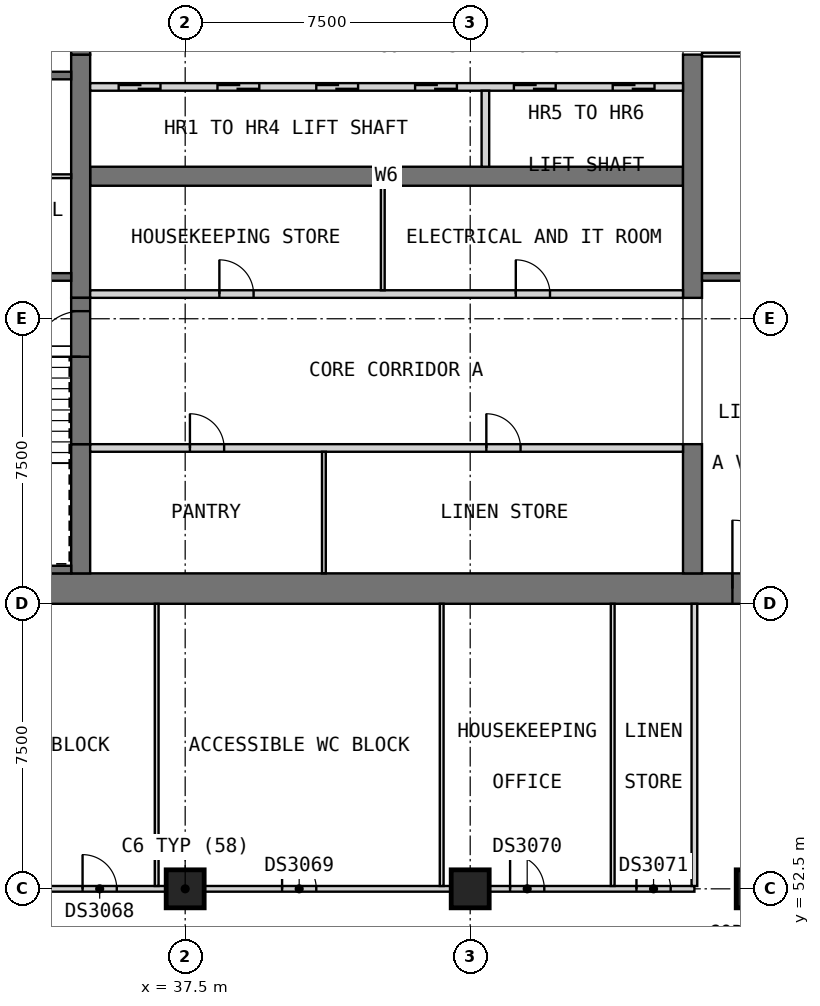
"""IFC4 building model, lengths in metres.
Left out: names, types, materials, properties, quantities, classifications, styles, units other than length and angle.
Written with IfcOpenShell. Run it as: python <this file> out.ifc"""

import sys

from ifc_helpers import new_model, si_unit, direction, frame, frame_2d, origin, origin_2d, place, context, subcontext, project, spatial, rectangle, extrude, element, fill, save


model = new_model("IFC4")
c1 = context("Model", 3, precision=1e-05, world=origin(), true_north=direction((0.0, 1.0)))
c2 = subcontext(c1, "Body", "Model", "MODEL_VIEW")
j1 = project(units=[si_unit("LENGTHUNIT", "METRE"), si_unit("PLANEANGLEUNIT", "RADIAN")], contexts=[c1])
p1 = place(None, origin())
s1 = spatial("IfcSite", under=j1, at=p1, CompositionType="ELEMENT")
p2 = place(p1, origin())
s2 = spatial("IfcBuilding", under=s1, at=p2, CompositionType="ELEMENT")
p3 = place(p2, frame((0.0, 0.0, 137.4)))
s3 = spatial("IfcBuildingStorey", under=s2, at=p3, CompositionType="ELEMENT", Elevation=137.4)
for number, where, z_axis, x_axis in (
    (1, (37.5, 52.5, 0.0), (0.0, 0.0, 1.0), (1.0, 0.0, 0.0)),
    (2, (45.0, 52.5, 0.0), (0.0, 0.0, 1.0), (1.0, 0.0, 0.0)),
    (3, (52.5, 52.5, 0.0), (0.0, 0.0, 1.0), (1.0, 0.0, 0.0)),
):
    element("IfcColumn", number, at=place(p3, frame(where, z_axis=z_axis, x_axis=x_axis)), inside=s3, PredefinedType="COLUMN", context=c2, shape_type="SweptSolid", body=[
        extrude(rectangle(XDim=1.0, YDim=1.0, at=origin_2d()), origin(), (0.0, 0.0, 1.0), 3.6),
    ])
p4 = place(p3, frame((30.0, 60.4, 0.0), z_axis=(0.0, 0.0, 1.0), x_axis=(1.0, 0.0, 0.0)))
e4 = element("IfcWall", 4, at=p4, inside=s3, PredefinedType="SHEAR", context=c2, shape_type="SweptSolid", body=[
    extrude(rectangle(XDim=30.0, YDim=0.8, at=frame_2d((15.0, 0.0))), origin(), (0.0, 0.0, 1.0), 3.6),
])
p5 = place(p4, frame((21.9, 0.0, 0.0)))
e5 = element("IfcOpeningElement", 5, at=p5, cuts=e4, PredefinedType="OPENING", context=c2, shape_type="SweptSolid", body=[
    extrude(rectangle(XDim=1.8, YDim=2.1, at=frame_2d((0.9, 1.05))), frame((0.0, 0.41, 0.0), z_axis=(0.0, -1.0, 0.0), x_axis=(1.0, 0.0, 0.0)), (0.0, 0.0, 1.0), 0.82),
])
p6 = place(p4, frame((26.5, 0.0, 0.0)))
e6 = element("IfcOpeningElement", 6, at=p6, cuts=e4, PredefinedType="OPENING", context=c2, shape_type="SweptSolid", body=[
    extrude(rectangle(XDim=1.2, YDim=2.1, at=frame_2d((0.6, 1.05))), frame((0.0, 0.41, 0.0), z_axis=(0.0, -1.0, 0.0), x_axis=(1.0, 0.0, 0.0)), (0.0, 0.0, 1.0), 0.82),
])
p7 = place(p3, frame((35.0, 71.25, 0.0), z_axis=(0.0, 0.0, 1.0), x_axis=(1.0, 0.0, 0.0)))
e7 = element("IfcWall", 7, at=p7, inside=s3, PredefinedType="SHEAR", context=c2, shape_type="SweptSolid", body=[
    extrude(rectangle(XDim=15.6, YDim=0.5, at=frame_2d((7.8, 0.0))), origin(), (0.0, 0.0, 1.0), 3.6),
])
p8 = place(p3, frame((34.75, 60.8, 0.0), z_axis=(0.0, 0.0, 1.0), x_axis=(0.0, 1.0, 0.0)))
e8 = element("IfcWall", 8, at=p8, inside=s3, PredefinedType="SHEAR", context=c2, shape_type="SweptSolid", body=[
    extrude(rectangle(XDim=3.4, YDim=0.5, at=frame_2d((1.7, 0.0))), origin(), (0.0, 0.0, 1.0), 3.6),
])
p9 = place(p3, frame((34.75, 68.05, 0.0), z_axis=(0.0, 0.0, 1.0), x_axis=(0.0, 1.0, 0.0)))
e9 = element("IfcWall", 9, at=p9, inside=s3, PredefinedType="SHEAR", context=c2, shape_type="SweptSolid", body=[
    extrude(rectangle(XDim=6.4, YDim=0.5, at=frame_2d((3.2, 0.0))), origin(), (0.0, 0.0, 1.0), 3.6),
])
p10 = place(p3, frame((50.85, 60.8, 0.0), z_axis=(0.0, 0.0, 1.0), x_axis=(0.0, 1.0, 0.0)))
e10 = element("IfcWall", 10, at=p10, inside=s3, PredefinedType="SHEAR", context=c2, shape_type="SweptSolid", body=[
    extrude(rectangle(XDim=3.4, YDim=0.5, at=frame_2d((1.7, 0.0))), origin(), (0.0, 0.0, 1.0), 3.6),
])
p11 = place(p3, frame((50.85, 68.05, 0.0), z_axis=(0.0, 0.0, 1.0), x_axis=(0.0, 1.0, 0.0)))
e11 = element("IfcWall", 11, at=p11, inside=s3, PredefinedType="SHEAR", context=c2, shape_type="SweptSolid", body=[
    extrude(rectangle(XDim=6.4, YDim=0.5, at=frame_2d((3.2, 0.0))), origin(), (0.0, 0.0, 1.0), 3.6),
])
p12 = place(p3, frame((35.0, 64.1, 0.0), z_axis=(0.0, 0.0, 1.0), x_axis=(1.0, 0.0, 0.0)))
e12 = element("IfcWall", 12, at=p12, inside=s3, PredefinedType="PARTITIONING", context=c2, shape_type="SweptSolid", body=[
    extrude(rectangle(XDim=15.6, YDim=0.2, at=frame_2d((7.8, 0.0))), origin(), (0.0, 0.0, 1.0), 3.35),
])
p13 = place(p12, frame((2.625, 0.0, 0.0)))
e13 = element("IfcOpeningElement", 13, at=p13, cuts=e12, PredefinedType="OPENING", context=c2, shape_type="SweptSolid", body=[
    extrude(rectangle(XDim=0.9, YDim=2.1, at=frame_2d((0.45, 1.05))), frame((0.0, 0.11, 0.0), z_axis=(0.0, -1.0, 0.0), x_axis=(1.0, 0.0, 0.0)), (0.0, 0.0, 1.0), 0.22),
])
p14 = place(p12, frame((10.425, 0.0, 0.0)))
e14 = element("IfcOpeningElement", 14, at=p14, cuts=e12, PredefinedType="OPENING", context=c2, shape_type="SweptSolid", body=[
    extrude(rectangle(XDim=0.9, YDim=2.1, at=frame_2d((0.45, 1.05))), frame((0.0, 0.11, 0.0), z_axis=(0.0, -1.0, 0.0), x_axis=(1.0, 0.0, 0.0)), (0.0, 0.0, 1.0), 0.22),
])
p15 = place(p3, frame((41.15, 60.8, 0.0), z_axis=(0.0, 0.0, 1.0), x_axis=(0.0, 1.0, 0.0)))
e15 = element("IfcWall", 15, at=p15, inside=s3, PredefinedType="PARTITIONING", context=c2, shape_type="SweptSolid", body=[
    extrude(rectangle(XDim=3.2, YDim=0.1, at=frame_2d((1.6, 0.0))), origin(), (0.0, 0.0, 1.0), 3.35),
])
p16 = place(p3, frame((35.0, 68.15, 0.0), z_axis=(0.0, 0.0, 1.0), x_axis=(1.0, 0.0, 0.0)))
e16 = element("IfcWall", 16, at=p16, inside=s3, PredefinedType="PARTITIONING", context=c2, shape_type="SweptSolid", body=[
    extrude(rectangle(XDim=15.6, YDim=0.2, at=frame_2d((7.8, 0.0))), origin(), (0.0, 0.0, 1.0), 3.35),
])
p17 = place(p16, frame((3.4, 0.0, 0.0)))
e17 = element("IfcOpeningElement", 17, at=p17, cuts=e16, PredefinedType="OPENING", context=c2, shape_type="SweptSolid", body=[
    extrude(rectangle(XDim=0.9, YDim=2.1, at=frame_2d((0.45, 1.05))), frame((0.0, 0.11, 0.0), z_axis=(0.0, -1.0, 0.0), x_axis=(1.0, 0.0, 0.0)), (0.0, 0.0, 1.0), 0.22),
])
p18 = place(p16, frame((11.2, 0.0, 0.0)))
e18 = element("IfcOpeningElement", 18, at=p18, cuts=e16, PredefinedType="OPENING", context=c2, shape_type="SweptSolid", body=[
    extrude(rectangle(XDim=0.9, YDim=2.1, at=frame_2d((0.45, 1.05))), frame((0.0, 0.11, 0.0), z_axis=(0.0, -1.0, 0.0), x_axis=(1.0, 0.0, 0.0)), (0.0, 0.0, 1.0), 0.22),
])
p19 = place(p3, frame((42.7, 68.25, 0.0), z_axis=(0.0, 0.0, 1.0), x_axis=(0.0, 1.0, 0.0)))
e19 = element("IfcWall", 19, at=p19, inside=s3, PredefinedType="PARTITIONING", context=c2, shape_type="SweptSolid", body=[
    extrude(rectangle(XDim=2.75, YDim=0.1, at=frame_2d((1.375, 0.0))), origin(), (0.0, 0.0, 1.0), 3.35),
])
p20 = place(p3, frame((35.0, 73.6, 0.0), z_axis=(0.0, 0.0, 1.0), x_axis=(1.0, 0.0, 0.0)))
e20 = element("IfcWall", 20, at=p20, inside=s3, PredefinedType="SOLIDWALL", context=c2, shape_type="SweptSolid", body=[
    extrude(rectangle(XDim=15.6, YDim=0.2, at=frame_2d((7.8, 0.0))), origin(), (0.0, 0.0, 1.0), 3.6),
])
p21 = place(p20, frame((0.75, 0.0, 0.0)))
e21 = element("IfcOpeningElement", 21, at=p21, cuts=e20, PredefinedType="OPENING", context=c2, shape_type="SweptSolid", body=[
    extrude(rectangle(XDim=1.1, YDim=2.1, at=frame_2d((0.55, 1.05))), frame((0.0, 0.11, 0.0), z_axis=(0.0, -1.0, 0.0), x_axis=(1.0, 0.0, 0.0)), (0.0, 0.0, 1.0), 0.22),
])
p22 = place(p20, frame((3.35, 0.0, 0.0)))
e22 = element("IfcOpeningElement", 22, at=p22, cuts=e20, PredefinedType="OPENING", context=c2, shape_type="SweptSolid", body=[
    extrude(rectangle(XDim=1.1, YDim=2.1, at=frame_2d((0.55, 1.05))), frame((0.0, 0.11, 0.0), z_axis=(0.0, -1.0, 0.0), x_axis=(1.0, 0.0, 0.0)), (0.0, 0.0, 1.0), 0.22),
])
p23 = place(p20, frame((5.95, 0.0, 0.0)))
e23 = element("IfcOpeningElement", 23, at=p23, cuts=e20, PredefinedType="OPENING", context=c2, shape_type="SweptSolid", body=[
    extrude(rectangle(XDim=1.1, YDim=2.1, at=frame_2d((0.55, 1.05))), frame((0.0, 0.11, 0.0), z_axis=(0.0, -1.0, 0.0), x_axis=(1.0, 0.0, 0.0)), (0.0, 0.0, 1.0), 0.22),
])
p24 = place(p20, frame((8.55, 0.0, 0.0)))
e24 = element("IfcOpeningElement", 24, at=p24, cuts=e20, PredefinedType="OPENING", context=c2, shape_type="SweptSolid", body=[
    extrude(rectangle(XDim=1.1, YDim=2.1, at=frame_2d((0.55, 1.05))), frame((0.0, 0.11, 0.0), z_axis=(0.0, -1.0, 0.0), x_axis=(1.0, 0.0, 0.0)), (0.0, 0.0, 1.0), 0.22),
])
p25 = place(p20, frame((11.15, 0.0, 0.0)))
e25 = element("IfcOpeningElement", 25, at=p25, cuts=e20, PredefinedType="OPENING", context=c2, shape_type="SweptSolid", body=[
    extrude(rectangle(XDim=1.1, YDim=2.1, at=frame_2d((0.55, 1.05))), frame((0.0, 0.11, 0.0), z_axis=(0.0, -1.0, 0.0), x_axis=(1.0, 0.0, 0.0)), (0.0, 0.0, 1.0), 0.22),
])
p26 = place(p20, frame((13.75, 0.0, 0.0)))
e26 = element("IfcOpeningElement", 26, at=p26, cuts=e20, PredefinedType="OPENING", context=c2, shape_type="SweptSolid", body=[
    extrude(rectangle(XDim=1.1, YDim=2.1, at=frame_2d((0.55, 1.05))), frame((0.0, 0.11, 0.0), z_axis=(0.0, -1.0, 0.0), x_axis=(1.0, 0.0, 0.0)), (0.0, 0.0, 1.0), 0.22),
])
p27 = place(p3, frame((45.4, 71.5, 0.0), z_axis=(0.0, 0.0, 1.0), x_axis=(0.0, 1.0, 0.0)))
e27 = element("IfcWall", 27, at=p27, inside=s3, PredefinedType="SOLIDWALL", context=c2, shape_type="SweptSolid", body=[
    extrude(rectangle(XDim=2.0, YDim=0.2, at=frame_2d((1.0, 0.0))), origin(), (0.0, 0.0, 1.0), 3.6),
])
p28 = place(p3, frame((34.75, 64.2, 0.0), z_axis=(0.0, 0.0, 1.0), x_axis=(0.0, 1.0, 0.0)))
e28 = element("IfcWall", 28, at=p28, inside=s3, PredefinedType="SOLIDWALL", context=c2, shape_type="SweptSolid", body=[
    extrude(rectangle(XDim=3.85, YDim=0.5, at=frame_2d((1.925, 0.0))), origin(), (0.0, 0.0, 1.0), 2.4),
])
p29 = place(p28, frame((2.3, 0.0, 0.0)))
e29 = element("IfcOpeningElement", 29, at=p29, cuts=e28, PredefinedType="OPENING", context=c2, shape_type="SweptSolid", body=[
    extrude(rectangle(XDim=1.2, YDim=2.1, at=frame_2d((0.6, 1.05))), frame((0.0, 0.26, 0.0), z_axis=(0.0, -1.0, 0.0), x_axis=(1.0, 0.0, 0.0)), (0.0, 0.0, 1.0), 0.52),
])
p30 = place(p3, frame((34.75, 74.45, 0.0), z_axis=(0.0, 0.0, 1.0), x_axis=(0.0, 1.0, 0.0)))
e30 = element("IfcWall", 30, at=p30, inside=s3, PredefinedType="SOLIDWALL", context=c2, shape_type="SweptSolid", body=[
    extrude(rectangle(XDim=3.85, YDim=0.5, at=frame_2d((1.925, 0.0))), origin(), (0.0, 0.0, 1.0), 2.4),
])
p31 = place(p30, frame((1.0, 0.0, 0.0)))
e31 = element("IfcOpeningElement", 31, at=p31, cuts=e30, PredefinedType="OPENING", context=c2, shape_type="SweptSolid", body=[
    extrude(rectangle(XDim=1.2, YDim=2.1, at=frame_2d((0.6, 1.05))), frame((0.0, 0.26, 0.0), z_axis=(0.0, -1.0, 0.0), x_axis=(1.0, 0.0, 0.0)), (0.0, 0.0, 1.0), 0.52),
])
p32 = place(p3, frame((30.8, 68.6, 0.0), z_axis=(0.0, 0.0, 1.0), x_axis=(1.0, 0.0, 0.0)))
e32 = element("IfcWall", 32, at=p32, inside=s3, PredefinedType="SOLIDWALL", context=c2, shape_type="SweptSolid", body=[
    extrude(rectangle(XDim=3.7, YDim=0.2, at=frame_2d((1.85, 0.0))), origin(), (0.0, 0.0, 1.0), 3.35),
])
p33 = place(p32, frame((1.5, 0.0, 0.0)))
e33 = element("IfcOpeningElement", 33, at=p33, cuts=e32, PredefinedType="OPENING", context=c2, shape_type="SweptSolid", body=[
    extrude(rectangle(XDim=0.9, YDim=2.1, at=frame_2d((0.45, 1.05))), frame((0.0, 0.11, 0.0), z_axis=(0.0, -1.0, 0.0), x_axis=(1.0, 0.0, 0.0)), (0.0, 0.0, 1.0), 0.22),
])
p34 = place(p3, frame((30.8, 73.9, 0.0), z_axis=(0.0, 0.0, 1.0), x_axis=(1.0, 0.0, 0.0)))
e34 = element("IfcWall", 34, at=p34, inside=s3, PredefinedType="SOLIDWALL", context=c2, shape_type="SweptSolid", body=[
    extrude(rectangle(XDim=3.7, YDim=0.2, at=frame_2d((1.85, 0.0))), origin(), (0.0, 0.0, 1.0), 3.35),
])
p35 = place(p34, frame((1.5, 0.0, 0.0)))
e35 = element("IfcOpeningElement", 35, at=p35, cuts=e34, PredefinedType="OPENING", context=c2, shape_type="SweptSolid", body=[
    extrude(rectangle(XDim=0.9, YDim=2.1, at=frame_2d((0.45, 1.05))), frame((0.0, 0.11, 0.0), z_axis=(0.0, -1.0, 0.0), x_axis=(1.0, 0.0, 0.0)), (0.0, 0.0, 1.0), 0.22),
])
p36 = place(p3, frame((51.1, 68.6, 0.0), z_axis=(0.0, 0.0, 1.0), x_axis=(1.0, 0.0, 0.0)))
e36 = element("IfcWall", 36, at=p36, inside=s3, PredefinedType="SOLIDWALL", context=c2, shape_type="SweptSolid", body=[
    extrude(rectangle(XDim=8.1, YDim=0.2, at=frame_2d((4.05, 0.0))), origin(), (0.0, 0.0, 1.0), 3.35),
])
p37 = place(p3, frame((31.0, 60.9, 0.0), z_axis=(0.0, 0.0, 1.0), x_axis=(1.0, 0.0, 0.0)))
e37 = element("IfcWall", 37, at=p37, inside=s3, PredefinedType="SOLIDWALL", context=c2, shape_type="SweptSolid", body=[
    extrude(rectangle(XDim=3.5, YDim=0.2, at=frame_2d((1.75, 0.0))), origin(), (0.0, 0.0, 1.0), 3.35),
])
p38 = place(p3, frame((30.8, 71.25, 0.0), z_axis=(0.0, 0.0, 1.0), x_axis=(1.0, 0.0, 0.0)))
e38 = element("IfcWall", 38, at=p38, inside=s3, PredefinedType="PARTITIONING", context=c2, shape_type="SweptSolid", body=[
    extrude(rectangle(XDim=3.7, YDim=0.1, at=frame_2d((1.85, 0.0))), origin(), (0.0, 0.0, 1.0), 3.35),
])
p39 = place(p3, frame((51.1, 74.45, 0.0), z_axis=(0.0, 0.0, 1.0), x_axis=(1.0, 0.0, 0.0)))
e39 = element("IfcWall", 39, at=p39, inside=s3, PredefinedType="PARTITIONING", context=c2, shape_type="SweptSolid", body=[
    extrude(rectangle(XDim=8.1, YDim=0.1, at=frame_2d((4.05, 0.0))), origin(), (0.0, 0.0, 1.0), 3.35),
])
p40 = place(p39, frame((3.6, 0.0, 0.0)))
e40 = element("IfcOpeningElement", 40, at=p40, cuts=e39, PredefinedType="OPENING", context=c2, shape_type="SweptSolid", body=[
    extrude(rectangle(XDim=0.9, YDim=2.1, at=frame_2d((0.45, 1.05))), frame((0.0, 0.06, 0.0), z_axis=(0.0, -1.0, 0.0), x_axis=(1.0, 0.0, 0.0)), (0.0, 0.0, 1.0), 0.12),
])
p41 = place(p3, frame((33.75, 52.5, 0.0), z_axis=(0.0, 0.0, 1.0), x_axis=(1.0, 0.0, 0.0)))
e41 = element("IfcWall", 41, at=p41, inside=s3, PredefinedType="PARTITIONING", context=c2, shape_type="SweptSolid", body=[
    extrude(rectangle(XDim=17.15, YDim=0.15, at=frame_2d((8.575, 0.0))), origin(), (0.0, 0.0, 1.0), 3.35),
])
p42 = place(p41, frame((1.05, 0.0, 0.0)))
e42 = element("IfcOpeningElement", 42, at=p42, cuts=e41, PredefinedType="OPENING", context=c2, shape_type="SweptSolid", body=[
    extrude(rectangle(XDim=0.9, YDim=2.1, at=frame_2d((0.45, 1.05))), frame((0.0, 0.085, 0.0), z_axis=(0.0, -1.0, 0.0), x_axis=(1.0, 0.0, 0.0)), (0.0, 0.0, 1.0), 0.17),
])
p43 = place(p41, frame((6.3, 0.0, 0.0)))
e43 = element("IfcOpeningElement", 43, at=p43, cuts=e41, PredefinedType="OPENING", context=c2, shape_type="SweptSolid", body=[
    extrude(rectangle(XDim=0.9, YDim=2.1, at=frame_2d((0.45, 1.05))), frame((0.0, 0.085, 0.0), z_axis=(0.0, -1.0, 0.0), x_axis=(1.0, 0.0, 0.0)), (0.0, 0.0, 1.0), 0.17),
])
p44 = place(p41, frame((12.3, 0.0, 0.0)))
e44 = element("IfcOpeningElement", 44, at=p44, cuts=e41, PredefinedType="OPENING", context=c2, shape_type="SweptSolid", body=[
    extrude(rectangle(XDim=0.9, YDim=2.1, at=frame_2d((0.45, 1.05))), frame((0.0, 0.085, 0.0), z_axis=(0.0, -1.0, 0.0), x_axis=(1.0, 0.0, 0.0)), (0.0, 0.0, 1.0), 0.17),
])
p45 = place(p41, frame((15.625, 0.0, 0.0)))
e45 = element("IfcOpeningElement", 45, at=p45, cuts=e41, PredefinedType="OPENING", context=c2, shape_type="SweptSolid", body=[
    extrude(rectangle(XDim=0.9, YDim=2.1, at=frame_2d((0.45, 1.05))), frame((0.0, 0.085, 0.0), z_axis=(0.0, -1.0, 0.0), x_axis=(1.0, 0.0, 0.0)), (0.0, 0.0, 1.0), 0.17),
])
for number, where, z_axis, x_axis in (
    (46, (36.75, 52.575, 0.0), (0.0, 0.0, 1.0), (0.0, 1.0, 0.0)),
    (47, (44.25, 52.575, 0.0), (0.0, 0.0, 1.0), (0.0, 1.0, 0.0)),
    (48, (48.75, 52.575, 0.0), (0.0, 0.0, 1.0), (0.0, 1.0, 0.0)),
):
    element("IfcWall", number, at=place(p3, frame(where, z_axis=z_axis, x_axis=x_axis)), inside=s3, PredefinedType="PARTITIONING", context=c2, shape_type="SweptSolid", body=[
        extrude(rectangle(XDim=7.425, YDim=0.1, at=frame_2d((3.712, 0.0))), origin(), (0.0, 0.0, 1.0), 3.35),
    ])
p46 = place(p3, frame((50.9, 52.575, 0.0), z_axis=(0.0, 0.0, 1.0), x_axis=(0.0, 1.0, 0.0)))
e49 = element("IfcWall", 49, at=p46, inside=s3, PredefinedType="PARTITIONING", context=c2, shape_type="SweptSolid", body=[
    extrude(rectangle(XDim=7.425, YDim=0.15, at=frame_2d((3.712, 0.0))), origin(), (0.0, 0.0, 1.0), 3.35),
])
p47 = place(p13, origin())
e50 = element("IfcDoor", 50, at=p47, inside=s3, OperationType="SINGLE_SWING_LEFT", PredefinedType="DOOR", context=c2, shape_type="SweptSolid", body=[
    extrude(rectangle(XDim=0.9, YDim=2.1, at=frame_2d((0.45, 1.05))), frame((0.0, 0.025, 0.0), z_axis=(0.0, -1.0, 0.0), x_axis=(1.0, 0.0, 0.0)), (0.0, 0.0, 1.0), 0.05),
])
fill(e13, e50)
p48 = place(p14, origin())
e51 = element("IfcDoor", 51, at=p48, inside=s3, OperationType="SINGLE_SWING_RIGHT", PredefinedType="DOOR", context=c2, shape_type="SweptSolid", body=[
    extrude(rectangle(XDim=0.9, YDim=2.1, at=frame_2d((0.45, 1.05))), frame((0.0, 0.025, 0.0), z_axis=(0.0, -1.0, 0.0), x_axis=(1.0, 0.0, 0.0)), (0.0, 0.0, 1.0), 0.05),
])
fill(e14, e51)
p49 = place(p17, origin())
e52 = element("IfcDoor", 52, at=p49, inside=s3, OperationType="SINGLE_SWING_LEFT", PredefinedType="DOOR", context=c2, shape_type="SweptSolid", body=[
    extrude(rectangle(XDim=0.9, YDim=2.1, at=frame_2d((0.45, 1.05))), frame((0.0, 0.025, 0.0), z_axis=(0.0, -1.0, 0.0), x_axis=(1.0, 0.0, 0.0)), (0.0, 0.0, 1.0), 0.05),
])
fill(e17, e52)
p50 = place(p18, origin())
e53 = element("IfcDoor", 53, at=p50, inside=s3, OperationType="SINGLE_SWING_RIGHT", PredefinedType="DOOR", context=c2, shape_type="SweptSolid", body=[
    extrude(rectangle(XDim=0.9, YDim=2.1, at=frame_2d((0.45, 1.05))), frame((0.0, 0.025, 0.0), z_axis=(0.0, -1.0, 0.0), x_axis=(1.0, 0.0, 0.0)), (0.0, 0.0, 1.0), 0.05),
])
fill(e18, e53)
p51 = place(p21, origin())
e54 = element("IfcDoor", 54, at=p51, inside=s3, OperationType="DOUBLE_DOOR_SLIDING", PredefinedType="DOOR", context=c2, shape_type="SweptSolid", body=[
    extrude(rectangle(XDim=1.1, YDim=2.1, at=frame_2d((0.55, 1.05))), frame((0.0, 0.025, 0.0), z_axis=(0.0, -1.0, 0.0), x_axis=(1.0, 0.0, 0.0)), (0.0, 0.0, 1.0), 0.05),
])
fill(e21, e54)
p52 = place(p22, origin())
e55 = element("IfcDoor", 55, at=p52, inside=s3, OperationType="DOUBLE_DOOR_SLIDING", PredefinedType="DOOR", context=c2, shape_type="SweptSolid", body=[
    extrude(rectangle(XDim=1.1, YDim=2.1, at=frame_2d((0.55, 1.05))), frame((0.0, 0.025, 0.0), z_axis=(0.0, -1.0, 0.0), x_axis=(1.0, 0.0, 0.0)), (0.0, 0.0, 1.0), 0.05),
])
fill(e22, e55)
p53 = place(p23, origin())
e56 = element("IfcDoor", 56, at=p53, inside=s3, OperationType="DOUBLE_DOOR_SLIDING", PredefinedType="DOOR", context=c2, shape_type="SweptSolid", body=[
    extrude(rectangle(XDim=1.1, YDim=2.1, at=frame_2d((0.55, 1.05))), frame((0.0, 0.025, 0.0), z_axis=(0.0, -1.0, 0.0), x_axis=(1.0, 0.0, 0.0)), (0.0, 0.0, 1.0), 0.05),
])
fill(e23, e56)
p54 = place(p24, origin())
e57 = element("IfcDoor", 57, at=p54, inside=s3, OperationType="DOUBLE_DOOR_SLIDING", PredefinedType="DOOR", context=c2, shape_type="SweptSolid", body=[
    extrude(rectangle(XDim=1.1, YDim=2.1, at=frame_2d((0.55, 1.05))), frame((0.0, 0.025, 0.0), z_axis=(0.0, -1.0, 0.0), x_axis=(1.0, 0.0, 0.0)), (0.0, 0.0, 1.0), 0.05),
])
fill(e24, e57)
p55 = place(p25, origin())
e58 = element("IfcDoor", 58, at=p55, inside=s3, OperationType="DOUBLE_DOOR_SLIDING", PredefinedType="DOOR", context=c2, shape_type="SweptSolid", body=[
    extrude(rectangle(XDim=1.1, YDim=2.1, at=frame_2d((0.55, 1.05))), frame((0.0, 0.025, 0.0), z_axis=(0.0, -1.0, 0.0), x_axis=(1.0, 0.0, 0.0)), (0.0, 0.0, 1.0), 0.05),
])
fill(e25, e58)
p56 = place(p26, origin())
e59 = element("IfcDoor", 59, at=p56, inside=s3, OperationType="DOUBLE_DOOR_SLIDING", PredefinedType="DOOR", context=c2, shape_type="SweptSolid", body=[
    extrude(rectangle(XDim=1.1, YDim=2.1, at=frame_2d((0.55, 1.05))), frame((0.0, 0.025, 0.0), z_axis=(0.0, -1.0, 0.0), x_axis=(1.0, 0.0, 0.0)), (0.0, 0.0, 1.0), 0.05),
])
fill(e26, e59)
p57 = place(p5, origin())
e60 = element("IfcDoor", 60, at=p57, inside=s3, OperationType="DOUBLE_DOOR_SINGLE_SWING", PredefinedType="DOOR", context=c2, shape_type="SweptSolid", body=[
    extrude(rectangle(XDim=1.8, YDim=2.1, at=frame_2d((0.9, 1.05))), frame((0.0, 0.025, 0.0), z_axis=(0.0, -1.0, 0.0), x_axis=(1.0, 0.0, 0.0)), (0.0, 0.0, 1.0), 0.05),
])
fill(e5, e60)
p58 = place(p29, origin())
e61 = element("IfcDoor", 61, at=p58, inside=s3, OperationType="SINGLE_SWING_LEFT", PredefinedType="DOOR", context=c2, shape_type="SweptSolid", body=[
    extrude(rectangle(XDim=1.2, YDim=2.1, at=frame_2d((0.6, 1.05))), frame((0.0, 0.025, 0.0), z_axis=(0.0, -1.0, 0.0), x_axis=(1.0, 0.0, 0.0)), (0.0, 0.0, 1.0), 0.05),
])
fill(e29, e61)
p59 = place(p42, origin())
e62 = element("IfcDoor", 62, at=p59, inside=s3, OperationType="SINGLE_SWING_LEFT", PredefinedType="DOOR", context=c2, shape_type="SweptSolid", body=[
    extrude(rectangle(XDim=0.9, YDim=2.1, at=frame_2d((0.45, 1.05))), frame((0.0, 0.025, 0.0), z_axis=(0.0, -1.0, 0.0), x_axis=(1.0, 0.0, 0.0)), (0.0, 0.0, 1.0), 0.05),
])
fill(e42, e62)
p60 = place(p43, origin())
e63 = element("IfcDoor", 63, at=p60, inside=s3, OperationType="SINGLE_SWING_LEFT", PredefinedType="DOOR", context=c2, shape_type="SweptSolid", body=[
    extrude(rectangle(XDim=0.9, YDim=2.1, at=frame_2d((0.45, 1.05))), frame((0.0, 0.025, 0.0), z_axis=(0.0, -1.0, 0.0), x_axis=(1.0, 0.0, 0.0)), (0.0, 0.0, 1.0), 0.05),
])
fill(e43, e63)
p61 = place(p44, origin())
e64 = element("IfcDoor", 64, at=p61, inside=s3, OperationType="SINGLE_SWING_LEFT", PredefinedType="DOOR", context=c2, shape_type="SweptSolid", body=[
    extrude(rectangle(XDim=0.9, YDim=2.1, at=frame_2d((0.45, 1.05))), frame((0.0, 0.025, 0.0), z_axis=(0.0, -1.0, 0.0), x_axis=(1.0, 0.0, 0.0)), (0.0, 0.0, 1.0), 0.05),
])
fill(e44, e64)
p62 = place(p45, origin())
e65 = element("IfcDoor", 65, at=p62, inside=s3, OperationType="SINGLE_SWING_LEFT", PredefinedType="DOOR", context=c2, shape_type="SweptSolid", body=[
    extrude(rectangle(XDim=0.9, YDim=2.1, at=frame_2d((0.45, 1.05))), frame((0.0, 0.025, 0.0), z_axis=(0.0, -1.0, 0.0), x_axis=(1.0, 0.0, 0.0)), (0.0, 0.0, 1.0), 0.05),
])
fill(e45, e65)
save(model, sys.argv[1])
